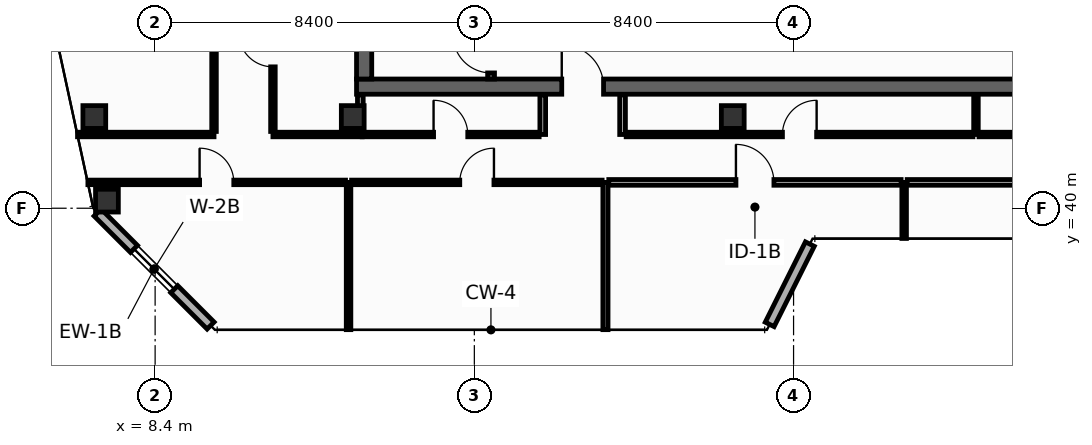
"""IFC4 building model, lengths in metres.
Left out: names, types, materials, properties, quantities, classifications, styles, units other than length and angle.
Written with IfcOpenShell. Run it as: python <this file> out.ifc"""

import sys

from ifc_helpers import new_model, si_unit, direction, frame, frame_2d, origin, origin_2d, place, context, subcontext, project, spatial, rectangle, hollow_rectangle, extrude, element, fill, save


model = new_model("IFC4")
c1 = context("Model", 3, precision=1e-05, world=origin(), true_north=direction((0.0, 1.0)))
c2 = subcontext(c1, "Body", "Model", "MODEL_VIEW")
j1 = project(units=[si_unit("LENGTHUNIT", "METRE"), si_unit("PLANEANGLEUNIT", "RADIAN")], contexts=[c1])
p1 = place(None, origin())
s1 = spatial("IfcSite", under=j1, at=p1, CompositionType="ELEMENT")
p2 = place(p1, origin())
s2 = spatial("IfcBuilding", under=s1, at=p2, CompositionType="ELEMENT")
p3 = place(p2, frame((0.0, 0.0, 323.4)))
s3 = spatial("IfcBuildingStorey", under=s2, at=p3, CompositionType="ELEMENT", Elevation=323.4)
p4 = place(p3, frame((13.7, 43.2, 0.0), z_axis=(0.0, 0.0, 1.0), x_axis=(1.0, 0.0, 0.0)))
e1 = element("IfcWall", 1, at=p4, inside=s3, PredefinedType="SHEAR", context=c2, shape_type="SweptSolid", body=[
    extrude(rectangle(XDim=32.5, YDim=0.4, at=frame_2d((16.25, 0.0))), origin(), (0.0, 0.0, 1.0), 3.9),
])
p5 = place(p4, frame((5.4, 0.0, 0.0)))
e2 = element("IfcOpeningElement", 2, at=p5, cuts=e1, PredefinedType="OPENING", context=c2, shape_type="SweptSolid", body=[
    extrude(rectangle(XDim=1.1, YDim=2.15, at=frame_2d((0.55, 1.075))), frame((0.0, 0.21, 0.0), z_axis=(0.0, -1.0, 0.0), x_axis=(1.0, 0.0, 0.0)), (0.0, 0.0, 1.0), 0.42),
])
p6 = place(p4, frame((25.6, 0.0, 0.0)))
e3 = element("IfcOpeningElement", 3, at=p6, cuts=e1, PredefinedType="OPENING", context=c2, shape_type="SweptSolid", body=[
    extrude(rectangle(XDim=1.1, YDim=2.15, at=frame_2d((0.55, 1.075))), frame((0.0, 0.21, 0.0), z_axis=(0.0, -1.0, 0.0), x_axis=(1.0, 0.0, 0.0)), (0.0, 0.0, 1.0), 0.42),
])
p7 = place(p3, frame((13.9, 43.4, 0.0), z_axis=(0.0, 0.0, 1.0), x_axis=(0.0, 1.0, 0.0)))
e4 = element("IfcWall", 4, at=p7, inside=s3, PredefinedType="SHEAR", context=c2, shape_type="SweptSolid", body=[
    extrude(rectangle(XDim=10.4, YDim=0.4, at=frame_2d((5.2, 0.0))), origin(), (0.0, 0.0, 1.0), 3.9),
])
for number, where, z_axis, x_axis in (
    (5, (6.8, 42.4, 0.0), (0.0, 0.0, 1.0), (1.0, 0.0, 0.0)),
    (6, (13.6, 42.4, 0.0), (0.0, 0.0, 1.0), (1.0, 0.0, 0.0)),
    (7, (23.6, 42.4, 0.0), (0.0, 0.0, 1.0), (1.0, 0.0, 0.0)),
    (8, (7.132, 40.2, 0.0), (0.0, 0.0, 1.0), (1.0, 0.0, 0.0)),
):
    element("IfcColumn", number, at=place(p3, frame(where, z_axis=z_axis, x_axis=x_axis)), inside=s3, PredefinedType="COLUMN", context=c2, shape_type="SweptSolid", body=[
        extrude(hollow_rectangle(XDim=0.6, YDim=0.6, WallThickness=0.028, at=origin_2d()), origin(), (0.0, 0.0, 1.0), 4.2),
    ])
p8 = place(p3, frame((17.24, 43.4, 0.0), z_axis=(0.0, 0.0, 1.0), x_axis=(0.0, 1.0, 0.0)))
e9 = element("IfcWall", 9, at=p8, inside=s3, PredefinedType="SHEAR", context=c2, shape_type="SweptSolid", body=[
    extrude(rectangle(XDim=10.4, YDim=0.18, at=frame_2d((5.2, 0.0))), origin(), (0.0, 0.0, 1.0), 3.9),
])
p9 = place(p8, frame((0.16, 0.0, 0.0)))
e10 = element("IfcOpeningElement", 10, at=p9, cuts=e9, PredefinedType="OPENING", context=c2, shape_type="SweptSolid", body=[
    extrude(rectangle(XDim=1.0, YDim=2.15, at=frame_2d((0.5, 1.075))), frame((0.0, 0.1, 0.0), z_axis=(0.0, -1.0, 0.0), x_axis=(1.0, 0.0, 0.0)), (0.0, 0.0, 1.0), 0.2),
])
p10 = place(p3, frame((6.886, 39.887, 0.0), z_axis=(0.0, 0.0, 1.0), x_axis=(0.70707775441, -0.707135806771, 0.0)))
e11 = element("IfcWall", 11, at=p10, inside=s3, PredefinedType="STANDARD", context=c2, shape_type="SweptSolid", body=[
    extrude(rectangle(XDim=4.206, YDim=0.26, at=frame_2d((2.103, 0.0))), origin(), (0.0, 0.0, 1.0), 3.9),
])
p11 = place(p10, frame((1.353, 0.0, 0.9)))
e12 = element("IfcOpeningElement", 12, at=p11, cuts=e11, PredefinedType="OPENING", context=c2, shape_type="SweptSolid", body=[
    extrude(rectangle(XDim=1.5, YDim=1.85, at=frame_2d((0.75, 0.925))), frame((0.0, 0.14, 0.0), z_axis=(0.0, -1.0, 0.0), x_axis=(1.0, 0.0, 0.0)), (0.0, 0.0, 1.0), 0.28),
])
p12 = place(p3, frame((24.572, 36.943, 0.0), z_axis=(0.0, 0.0, 1.0), x_axis=(0.4472135955, 0.894427191, 0.0)))
e13 = element("IfcWall", 13, at=p12, inside=s3, PredefinedType="STANDARD", context=c2, shape_type="SweptSolid", body=[
    extrude(rectangle(XDim=2.363, YDim=0.26, at=frame_2d((1.182, 0.0))), origin(), (0.0, 0.0, 1.0), 3.9),
])
p13 = place(p3, frame((6.358, 41.94, 0.0), z_axis=(0.0, 0.0, 1.0), x_axis=(1.0, 0.0, 0.0)))
e14 = element("IfcWall", 14, at=p13, inside=s3, PredefinedType="PARTITIONING", context=c2, shape_type="SweptSolid", body=[
    extrude(rectangle(XDim=3.592, YDim=0.12, at=frame_2d((1.796, 0.0))), origin(), (0.0, 0.0, 1.0), 3.435),
])
p14 = place(p3, frame((11.5, 41.94, 0.0), z_axis=(0.0, 0.0, 1.0), x_axis=(1.0, 0.0, 0.0)))
e15 = element("IfcWall", 15, at=p14, inside=s3, PredefinedType="PARTITIONING", context=c2, shape_type="SweptSolid", body=[
    extrude(rectangle(XDim=2.35, YDim=0.12, at=frame_2d((1.175, 0.0))), origin(), (0.0, 0.0, 1.0), 3.9),
])
p15 = place(p3, frame((9.95, 42.02, 0.0), z_axis=(0.0, 0.0, 1.0), x_axis=(0.0, 1.0, 0.0)))
e16 = element("IfcWall", 16, at=p15, inside=s3, PredefinedType="PARTITIONING", context=c2, shape_type="SweptSolid", body=[
    extrude(rectangle(XDim=6.3, YDim=0.12, at=frame_2d((3.15, 0.0))), origin(), (0.0, 0.0, 1.0), 3.297),
])
p16 = place(p15, frame((2.7, 0.0, 0.0)))
e17 = element("IfcOpeningElement", 17, at=p16, cuts=e16, PredefinedType="OPENING", context=c2, shape_type="SweptSolid", body=[
    extrude(rectangle(XDim=0.9, YDim=2.1, at=frame_2d((0.45, 1.05))), frame((0.0, 0.07, 0.0), z_axis=(0.0, -1.0, 0.0), x_axis=(1.0, 0.0, 0.0)), (0.0, 0.0, 1.0), 0.14),
])
p17 = place(p3, frame((11.5, 42.02, 0.0), z_axis=(0.0, 0.0, 1.0), x_axis=(0.0, 1.0, 0.0)))
e18 = element("IfcWall", 18, at=p17, inside=s3, PredefinedType="PARTITIONING", context=c2, shape_type="SweptSolid", body=[
    extrude(rectangle(XDim=4.3, YDim=0.12, at=frame_2d((2.15, 0.0))), origin(), (0.0, 0.0, 1.0), 3.297),
])
p18 = place(p17, frame((1.7, 0.0, 0.0)))
e19 = element("IfcOpeningElement", 19, at=p18, cuts=e18, PredefinedType="OPENING", context=c2, shape_type="SweptSolid", body=[
    extrude(rectangle(XDim=0.9, YDim=2.1, at=frame_2d((0.45, 1.05))), frame((0.0, 0.07, 0.0), z_axis=(0.0, -1.0, 0.0), x_axis=(1.0, 0.0, 0.0)), (0.0, 0.0, 1.0), 0.14),
])
p19 = place(p3, frame((13.8, 42.02, 0.0), z_axis=(0.0, 0.0, 1.0), x_axis=(0.0, 1.0, 0.0)))
e20 = element("IfcWall", 20, at=p19, inside=s3, PredefinedType="PARTITIONING", context=c2, shape_type="SweptSolid", body=[
    extrude(rectangle(XDim=0.96, YDim=0.15, at=frame_2d((0.48, 0.0))), origin(), (0.0, 0.0, 1.0), 3.9),
])
for number, where, z_axis, x_axis in (
    (21, (18.6, 41.94, 0.0), (0.0, 0.0, 1.0), (0.0, 1.0, 0.0)),
    (22, (20.7, 41.94, 0.0), (0.0, 0.0, 1.0), (0.0, 1.0, 0.0)),
):
    element("IfcWall", number, at=place(p3, frame(where, z_axis=z_axis, x_axis=x_axis)), inside=s3, PredefinedType="PARTITIONING", context=c2, shape_type="SweptSolid", body=[
        extrude(rectangle(XDim=1.04, YDim=0.15, at=frame_2d((0.52, 0.0))), origin(), (0.0, 0.0, 1.0), 3.9),
    ])
p20 = place(p3, frame((13.85, 41.94, 0.0), z_axis=(0.0, 0.0, 1.0), x_axis=(1.0, 0.0, 0.0)))
e23 = element("IfcWall", 23, at=p20, inside=s3, PredefinedType="PARTITIONING", context=c2, shape_type="SweptSolid", body=[
    extrude(rectangle(XDim=4.655, YDim=0.12, at=frame_2d((2.327, 0.0))), origin(), (0.0, 0.0, 1.0), 3.9),
])
p21 = place(p20, frame((1.877, 0.0, 0.0)))
e24 = element("IfcOpeningElement", 24, at=p21, cuts=e23, PredefinedType="OPENING", context=c2, shape_type="SweptSolid", body=[
    extrude(rectangle(XDim=0.9, YDim=2.1, at=frame_2d((0.45, 1.05))), frame((0.0, 0.07, 0.0), z_axis=(0.0, -1.0, 0.0), x_axis=(1.0, 0.0, 0.0)), (0.0, 0.0, 1.0), 0.14),
])
p22 = place(p3, frame((30.0, 41.94, 0.0), z_axis=(0.0, 0.0, 1.0), x_axis=(0.0, 1.0, 0.0)))
e25 = element("IfcWall", 25, at=p22, inside=s3, PredefinedType="PARTITIONING", context=c2, shape_type="SweptSolid", body=[
    extrude(rectangle(XDim=1.04, YDim=0.12, at=frame_2d((0.52, 0.0))), origin(), (0.0, 0.0, 1.0), 3.297),
])
p23 = place(p3, frame((20.795, 41.94, 0.0), z_axis=(0.0, 0.0, 1.0), x_axis=(1.0, 0.0, 0.0)))
e26 = element("IfcWall", 26, at=p23, inside=s3, PredefinedType="PARTITIONING", context=c2, shape_type="SweptSolid", body=[
    extrude(rectangle(XDim=9.125, YDim=0.12, at=frame_2d((4.562, 0.0))), origin(), (0.0, 0.0, 1.0), 3.9),
])
p24 = place(p23, frame((4.112, 0.0, 0.0)))
e27 = element("IfcOpeningElement", 27, at=p24, cuts=e26, PredefinedType="OPENING", context=c2, shape_type="SweptSolid", body=[
    extrude(rectangle(XDim=0.9, YDim=2.1, at=frame_2d((0.45, 1.05))), frame((0.0, 0.07, 0.0), z_axis=(0.0, -1.0, 0.0), x_axis=(1.0, 0.0, 0.0)), (0.0, 0.0, 1.0), 0.14),
])
p25 = place(p3, frame((30.08, 41.94, 0.0), z_axis=(0.0, 0.0, 1.0), x_axis=(1.0, 0.0, 0.0)))
e28 = element("IfcWall", 28, at=p25, inside=s3, PredefinedType="PARTITIONING", context=c2, shape_type="SweptSolid", body=[
    extrude(rectangle(XDim=8.625, YDim=0.12, at=frame_2d((4.312, 0.0))), origin(), (0.0, 0.0, 1.0), 3.9),
])
p26 = place(p25, frame((3.788, 0.0, 0.0)))
e29 = element("IfcOpeningElement", 29, at=p26, cuts=e28, PredefinedType="OPENING", context=c2, shape_type="SweptSolid", body=[
    extrude(rectangle(XDim=1.05, YDim=2.15, at=frame_2d((0.525, 1.075))), frame((0.0, 0.07, 0.0), z_axis=(0.0, -1.0, 0.0), x_axis=(1.0, 0.0, 0.0)), (0.0, 0.0, 1.0), 0.14),
])
p27 = place(p3, frame((13.49, 36.805, 0.0), z_axis=(0.0, 0.0, 1.0), x_axis=(0.0, 1.0, 0.0)))
e30 = element("IfcWall", 30, at=p27, inside=s3, PredefinedType="PARTITIONING", context=c2, shape_type="SweptSolid", body=[
    extrude(rectangle(XDim=3.875, YDim=0.12, at=frame_2d((1.938, 0.0))), origin(), (0.0, 0.0, 1.0), 3.9),
])
p28 = place(p3, frame((20.25, 36.805, 0.0), z_axis=(0.0, 0.0, 1.0), x_axis=(0.0, 1.0, 0.0)))
e31 = element("IfcWall", 31, at=p28, inside=s3, PredefinedType="PARTITIONING", context=c2, shape_type="SweptSolid", body=[
    extrude(rectangle(XDim=3.875, YDim=0.135, at=frame_2d((1.938, 0.0))), origin(), (0.0, 0.0, 1.0), 3.9),
])
p29 = place(p3, frame((28.11, 39.205, 0.0), z_axis=(0.0, 0.0, 1.0), x_axis=(0.0, 1.0, 0.0)))
e32 = element("IfcWall", 32, at=p29, inside=s3, PredefinedType="PARTITIONING", context=c2, shape_type="SweptSolid", body=[
    extrude(rectangle(XDim=1.475, YDim=0.12, at=frame_2d((0.737, 0.0))), origin(), (0.0, 0.0, 1.0), 3.9),
])
p30 = place(p3, frame((6.631, 40.68, 0.0), z_axis=(0.0, 0.0, 1.0), x_axis=(1.0, 0.0, 0.0)))
e33 = element("IfcWall", 33, at=p30, inside=s3, PredefinedType="PARTITIONING", context=c2, shape_type="SweptSolid", body=[
    extrude(rectangle(XDim=6.779, YDim=0.12, at=frame_2d((3.389, 0.0))), origin(), (0.0, 0.0, 1.0), 3.435),
])
p31 = place(p30, frame((2.939, 0.0, 0.0)))
e34 = element("IfcOpeningElement", 34, at=p31, cuts=e33, PredefinedType="OPENING", context=c2, shape_type="SweptSolid", body=[
    extrude(rectangle(XDim=0.9, YDim=2.1, at=frame_2d((0.45, 1.05))), frame((0.0, 0.07, 0.0), z_axis=(0.0, -1.0, 0.0), x_axis=(1.0, 0.0, 0.0)), (0.0, 0.0, 1.0), 0.14),
])
p32 = place(p3, frame((13.57, 40.68, 0.0), z_axis=(0.0, 0.0, 1.0), x_axis=(1.0, 0.0, 0.0)))
e35 = element("IfcWall", 35, at=p32, inside=s3, PredefinedType="PARTITIONING", context=c2, shape_type="SweptSolid", body=[
    extrude(rectangle(XDim=6.593, YDim=0.12, at=frame_2d((3.296, 0.0))), origin(), (0.0, 0.0, 1.0), 3.9),
])
p33 = place(p32, frame((2.846, 0.0, 0.0)))
e36 = element("IfcOpeningElement", 36, at=p33, cuts=e35, PredefinedType="OPENING", context=c2, shape_type="SweptSolid", body=[
    extrude(rectangle(XDim=0.9, YDim=2.1, at=frame_2d((0.45, 1.05))), frame((0.0, 0.07, 0.0), z_axis=(0.0, -1.0, 0.0), x_axis=(1.0, 0.0, 0.0)), (0.0, 0.0, 1.0), 0.14),
])
p34 = place(p3, frame((20.337, 40.68, 0.0), z_axis=(0.0, 0.0, 1.0), x_axis=(1.0, 0.0, 0.0)))
e37 = element("IfcWall", 37, at=p34, inside=s3, PredefinedType="PARTITIONING", context=c2, shape_type="SweptSolid", body=[
    extrude(rectangle(XDim=7.693, YDim=0.15, at=frame_2d((3.846, 0.0))), origin(), (0.0, 0.0, 1.0), 3.9),
])
p35 = place(p34, frame((3.346, 0.0, 0.0)))
e38 = element("IfcOpeningElement", 38, at=p35, cuts=e37, PredefinedType="OPENING", context=c2, shape_type="SweptSolid", body=[
    extrude(rectangle(XDim=1.0, YDim=2.15, at=frame_2d((0.5, 1.075))), frame((0.0, 0.085, 0.0), z_axis=(0.0, -1.0, 0.0), x_axis=(1.0, 0.0, 0.0)), (0.0, 0.0, 1.0), 0.17),
])
p36 = place(p3, frame((28.19, 40.68, 0.0), z_axis=(0.0, 0.0, 1.0), x_axis=(1.0, 0.0, 0.0)))
e39 = element("IfcWall", 39, at=p36, inside=s3, PredefinedType="PARTITIONING", context=c2, shape_type="SweptSolid", body=[
    extrude(rectangle(XDim=7.703, YDim=0.15, at=frame_2d((3.851, 0.0))), origin(), (0.0, 0.0, 1.0), 3.9),
])
p37 = place(p36, frame((3.326, 0.0, 0.0)))
e40 = element("IfcOpeningElement", 40, at=p37, cuts=e39, PredefinedType="OPENING", context=c2, shape_type="SweptSolid", body=[
    extrude(rectangle(XDim=1.05, YDim=2.15, at=frame_2d((0.525, 1.075))), frame((0.0, 0.085, 0.0), z_axis=(0.0, -1.0, 0.0), x_axis=(1.0, 0.0, 0.0)), (0.0, 0.0, 1.0), 0.17),
])
p38 = place(p9, origin())
e41 = element("IfcDoor", 41, at=p38, inside=s3, OperationType="SINGLE_SWING_RIGHT", PredefinedType="DOOR", context=c2, shape_type="SweptSolid", body=[
    extrude(rectangle(XDim=1.0, YDim=2.15, at=frame_2d((0.5, 1.075))), frame((0.0, 0.025, 0.0), z_axis=(0.0, -1.0, 0.0), x_axis=(1.0, 0.0, 0.0)), (0.0, 0.0, 1.0), 0.05),
])
fill(e10, e41)
p39 = place(p5, origin())
e42 = element("IfcDoor", 42, at=p39, inside=s3, OperationType="SINGLE_SWING_LEFT", PredefinedType="DOOR", context=c2, shape_type="SweptSolid", body=[
    extrude(rectangle(XDim=1.1, YDim=2.15, at=frame_2d((0.55, 1.075))), frame((0.0, 0.025, 0.0), z_axis=(0.0, -1.0, 0.0), x_axis=(1.0, 0.0, 0.0)), (0.0, 0.0, 1.0), 0.05),
])
fill(e2, e42)
p40 = place(p11, origin())
e43 = element("IfcWindow", 43, at=p40, inside=s3, PartitioningType="SINGLE_PANEL", PredefinedType="WINDOW", context=c2, shape_type="SweptSolid", body=[
    extrude(rectangle(XDim=1.5, YDim=1.85, at=frame_2d((0.75, 0.925))), frame((0.0, 0.03, 0.0), z_axis=(0.0, -1.0, 0.0), x_axis=(1.0, 0.0, 0.0)), (0.0, 0.0, 1.0), 0.06),
])
fill(e12, e43)
p41 = place(p18, origin())
e44 = element("IfcDoor", 44, at=p41, inside=s3, OperationType="SINGLE_SWING_RIGHT", PredefinedType="DOOR", context=c2, shape_type="SweptSolid", body=[
    extrude(rectangle(XDim=0.9, YDim=2.1, at=frame_2d((0.45, 1.05))), frame((0.0, 0.025, 0.0), z_axis=(0.0, -1.0, 0.0), x_axis=(1.0, 0.0, 0.0)), (0.0, 0.0, 1.0), 0.05),
])
fill(e19, e44)
p42 = place(p21, origin())
e45 = element("IfcDoor", 45, at=p42, inside=s3, OperationType="SINGLE_SWING_LEFT", PredefinedType="DOOR", context=c2, shape_type="SweptSolid", body=[
    extrude(rectangle(XDim=0.9, YDim=2.1, at=frame_2d((0.45, 1.05))), frame((0.0, 0.025, 0.0), z_axis=(0.0, -1.0, 0.0), x_axis=(1.0, 0.0, 0.0)), (0.0, 0.0, 1.0), 0.05),
])
fill(e24, e45)
p43 = place(p24, origin())
e46 = element("IfcDoor", 46, at=p43, inside=s3, OperationType="SINGLE_SWING_RIGHT", PredefinedType="DOOR", context=c2, shape_type="SweptSolid", body=[
    extrude(rectangle(XDim=0.9, YDim=2.1, at=frame_2d((0.45, 1.05))), frame((0.0, 0.025, 0.0), z_axis=(0.0, -1.0, 0.0), x_axis=(1.0, 0.0, 0.0)), (0.0, 0.0, 1.0), 0.05),
])
fill(e27, e46)
p44 = place(p31, origin())
e47 = element("IfcDoor", 47, at=p44, inside=s3, OperationType="SINGLE_SWING_LEFT", PredefinedType="DOOR", context=c2, shape_type="SweptSolid", body=[
    extrude(rectangle(XDim=0.9, YDim=2.1, at=frame_2d((0.45, 1.05))), frame((0.0, 0.025, 0.0), z_axis=(0.0, -1.0, 0.0), x_axis=(1.0, 0.0, 0.0)), (0.0, 0.0, 1.0), 0.05),
])
fill(e34, e47)
p45 = place(p33, origin())
e48 = element("IfcDoor", 48, at=p45, inside=s3, OperationType="SINGLE_SWING_RIGHT", PredefinedType="DOOR", context=c2, shape_type="SweptSolid", body=[
    extrude(rectangle(XDim=0.9, YDim=2.1, at=frame_2d((0.45, 1.05))), frame((0.0, 0.025, 0.0), z_axis=(0.0, -1.0, 0.0), x_axis=(1.0, 0.0, 0.0)), (0.0, 0.0, 1.0), 0.05),
])
fill(e36, e48)
p46 = place(p35, origin())
e49 = element("IfcDoor", 49, at=p46, inside=s3, OperationType="SINGLE_SWING_LEFT", PredefinedType="DOOR", context=c2, shape_type="SweptSolid", body=[
    extrude(rectangle(XDim=1.0, YDim=2.15, at=frame_2d((0.5, 1.075))), frame((0.0, 0.025, 0.0), z_axis=(0.0, -1.0, 0.0), x_axis=(1.0, 0.0, 0.0)), (0.0, 0.0, 1.0), 0.05),
])
fill(e38, e49)
save(model, sys.argv[1])
